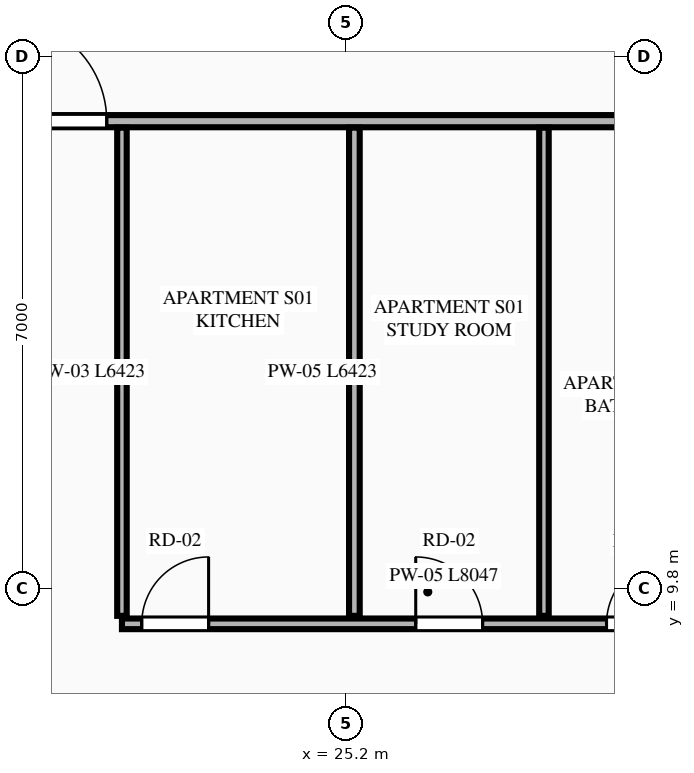
"""IFC4 building model, lengths in metres.
Left out: names, types, materials, properties, quantities, classifications, styles, units other than length and angle.
Written with IfcOpenShell. Run it as: python <this file> out.ifc"""

import sys

from ifc_helpers import new_model, si_unit, direction, frame, frame_2d, origin, place, context, subcontext, project, spatial, rectangle, extrude, element, fill, save


model = new_model("IFC4")
c1 = context("Model", 3, precision=1e-05, world=origin(), true_north=direction((0.0, 1.0)))
c2 = subcontext(c1, "Body", "Model", "MODEL_VIEW")
j1 = project(units=[si_unit("LENGTHUNIT", "METRE"), si_unit("PLANEANGLEUNIT", "RADIAN")], contexts=[c1])
p1 = place(None, origin())
s1 = spatial("IfcSite", under=j1, at=p1, CompositionType="ELEMENT")
p2 = place(p1, origin())
s2 = spatial("IfcBuilding", under=s1, at=p2, CompositionType="ELEMENT")
p3 = place(p2, frame((0.0, 0.0, 71.05)))
s3 = spatial("IfcBuildingStorey", under=s2, at=p3, CompositionType="ELEMENT", Elevation=71.05)
p4 = place(p3, frame((19.995, 15.95, 0.0), z_axis=(0.0, 0.0, 1.0), x_axis=(1.0, 0.0, 0.0)))
e1 = element("IfcWall", 1, at=p4, inside=s3, PredefinedType="PARTITIONING", context=c2, shape_type="SweptSolid", body=[
    extrude(rectangle(XDim=24.81, YDim=0.16, at=frame_2d((12.405, 0.0))), origin(), (0.0, 0.0, 1.0), 3.27),
])
p5 = place(p4, frame((0.705, 0.0, 0.0)))
e2 = element("IfcOpeningElement", 2, at=p5, cuts=e1, PredefinedType="OPENING", context=c2, shape_type="SweptSolid", body=[
    extrude(rectangle(XDim=1.35, YDim=2.35, at=frame_2d((0.675, 1.175))), frame((0.0, 0.09, 0.0), z_axis=(0.0, -1.0, 0.0), x_axis=(1.0, 0.0, 0.0)), (0.0, 0.0, 1.0), 0.18),
])
p6 = place(p3, frame((22.25, 9.442, 0.0), z_axis=(0.0, 0.0, 1.0), x_axis=(0.0, 1.0, 0.0)))
e3 = element("IfcWall", 3, at=p6, inside=s3, PredefinedType="PARTITIONING", context=c2, shape_type="SweptSolid", body=[
    extrude(rectangle(XDim=6.423, YDim=0.125, at=frame_2d((3.211, 0.0))), origin(), (0.0, 0.0, 1.0), 2.64),
])
p7 = place(p3, frame((22.25, 9.337, 0.0), z_axis=(0.0, 0.0, 1.0), x_axis=(1.0, 0.0, 0.0)))
e4 = element("IfcWall", 4, at=p7, inside=s3, PredefinedType="PLUMBINGWALL", context=c2, shape_type="SweptSolid", body=[
    extrude(rectangle(XDim=8.047, YDim=0.14, at=frame_2d((4.023, 0.0))), origin(), (0.0, 0.0, 1.0), 3.27),
])
p8 = place(p7, frame((6.375, 0.0, 0.0)))
e5 = element("IfcOpeningElement", 5, at=p8, cuts=e4, PredefinedType="OPENING", context=c2, shape_type="SweptSolid", body=[
    extrude(rectangle(XDim=0.86, YDim=2.1, at=frame_2d((0.43, 1.05))), frame((0.0, 0.08, 0.0), z_axis=(0.0, -1.0, 0.0), x_axis=(1.0, 0.0, 0.0)), (0.0, 0.0, 1.0), 0.16),
])
p9 = place(p7, frame((0.26, 0.0, 0.0)))
e6 = element("IfcOpeningElement", 6, at=p9, cuts=e4, PredefinedType="OPENING", context=c2, shape_type="SweptSolid", body=[
    extrude(rectangle(XDim=0.88, YDim=2.15, at=frame_2d((0.44, 1.075))), frame((0.0, 0.08, 0.0), z_axis=(0.0, -1.0, 0.0), x_axis=(1.0, 0.0, 0.0)), (0.0, 0.0, 1.0), 0.16),
])
p10 = place(p7, frame((3.865, 0.0, 0.0)))
e7 = element("IfcOpeningElement", 7, at=p10, cuts=e4, PredefinedType="OPENING", context=c2, shape_type="SweptSolid", body=[
    extrude(rectangle(XDim=0.88, YDim=2.15, at=frame_2d((0.44, 1.075))), frame((0.0, 0.08, 0.0), z_axis=(0.0, -1.0, 0.0), x_axis=(1.0, 0.0, 0.0)), (0.0, 0.0, 1.0), 0.16),
])
p11 = place(p3, frame((25.308, 9.442, 0.0), z_axis=(0.0, 0.0, 1.0), x_axis=(0.0, 1.0, 0.0)))
e8 = element("IfcWall", 8, at=p11, inside=s3, PredefinedType="PLUMBINGWALL", context=c2, shape_type="SweptSolid", body=[
    extrude(rectangle(XDim=6.423, YDim=0.14, at=frame_2d((3.211, 0.0))), origin(), (0.0, 0.0, 1.0), 3.27),
])
p12 = place(p3, frame((27.802, 9.442, 0.0), z_axis=(0.0, 0.0, 1.0), x_axis=(0.0, 1.0, 0.0)))
e9 = element("IfcWall", 9, at=p12, inside=s3, PredefinedType="PARTITIONING", context=c2, shape_type="SweptSolid", body=[
    extrude(rectangle(XDim=6.423, YDim=0.125, at=frame_2d((3.211, 0.0))), origin(), (0.0, 0.0, 1.0), 3.27),
])
p13 = place(p8, origin())
e10 = element("IfcDoor", 10, at=p13, inside=s3, OperationType="SINGLE_SWING_RIGHT", PredefinedType="DOOR", context=c2, shape_type="SweptSolid", body=[
    extrude(rectangle(XDim=0.86, YDim=2.1, at=frame_2d((0.43, 1.05))), frame((0.0, 0.025, 0.0), z_axis=(0.0, -1.0, 0.0), x_axis=(1.0, 0.0, 0.0)), (0.0, 0.0, 1.0), 0.05),
])
fill(e5, e10)
p14 = place(p5, origin())
e11 = element("IfcDoor", 11, at=p14, inside=s3, OperationType="SINGLE_SWING_LEFT", PredefinedType="DOOR", context=c2, shape_type="SweptSolid", body=[
    extrude(rectangle(XDim=1.35, YDim=2.35, at=frame_2d((0.675, 1.175))), frame((0.0, 0.025, 0.0), z_axis=(0.0, -1.0, 0.0), x_axis=(1.0, 0.0, 0.0)), (0.0, 0.0, 1.0), 0.05),
])
fill(e2, e11)
p15 = place(p9, origin())
e12 = element("IfcDoor", 12, at=p15, inside=s3, OperationType="SINGLE_SWING_RIGHT", PredefinedType="DOOR", context=c2, shape_type="SweptSolid", body=[
    extrude(rectangle(XDim=0.88, YDim=2.15, at=frame_2d((0.44, 1.075))), frame((0.0, 0.025, 0.0), z_axis=(0.0, -1.0, 0.0), x_axis=(1.0, 0.0, 0.0)), (0.0, 0.0, 1.0), 0.05),
])
fill(e6, e12)
p16 = place(p10, origin())
e13 = element("IfcDoor", 13, at=p16, inside=s3, OperationType="SINGLE_SWING_LEFT", PredefinedType="DOOR", context=c2, shape_type="SweptSolid", body=[
    extrude(rectangle(XDim=0.88, YDim=2.15, at=frame_2d((0.44, 1.075))), frame((0.0, 0.025, 0.0), z_axis=(0.0, -1.0, 0.0), x_axis=(1.0, 0.0, 0.0)), (0.0, 0.0, 1.0), 0.05),
])
fill(e7, e13)
save(model, sys.argv[1])
